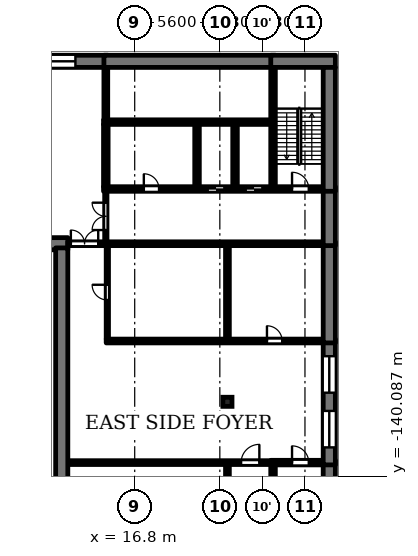
"""IFC4 building model, lengths in metres.
Left out: names, types, materials, properties, quantities, classifications, styles, units other than length and angle.
Written with IfcOpenShell. Run it as: python <this file> out.ifc"""

import sys

from ifc_helpers import new_model, si_unit, direction, frame, frame_2d, origin, origin_2d, place, context, subcontext, project, spatial, rectangle, extrude, element, fill, save


model = new_model("IFC4")
c1 = context("Model", 3, precision=1e-05, world=origin(), true_north=direction((0.0, 1.0)))
c2 = subcontext(c1, "Body", "Model", "MODEL_VIEW")
j1 = project(units=[si_unit("LENGTHUNIT", "METRE"), si_unit("PLANEANGLEUNIT", "RADIAN")], contexts=[c1])
p1 = place(None, origin())
s1 = spatial("IfcSite", under=j1, at=p1, CompositionType="ELEMENT")
p2 = place(p1, origin())
s2 = spatial("IfcBuilding", under=s1, at=p2, CompositionType="ELEMENT")
p3 = place(p2, frame((0.0, 0.0, 16.1)))
s3 = spatial("IfcBuildingStorey", under=s2, at=p3, CompositionType="ELEMENT", Elevation=16.1)
p4 = place(p3, frame((22.9, -135.2, 0.0), z_axis=(0.0, 0.0, 1.0), x_axis=(1.0, 0.0, 0.0)))
e1 = element("IfcColumn", 1, at=p4, inside=s3, PredefinedType="COLUMN", context=c2, shape_type="SweptSolid", body=[
    extrude(rectangle(XDim=0.6, YDim=0.6, at=origin_2d()), origin(), (0.0, 0.0, 1.0), 4.45),
])
p5 = place(p3, frame((12.4, -139.2, 0.0), z_axis=(0.0, 0.0, 1.0), x_axis=(1.0, 0.0, 0.0)))
e2 = element("IfcWall", 2, at=p5, inside=s3, PredefinedType="SOLIDWALL", context=c2, shape_type="SweptSolid", body=[
    extrude(rectangle(XDim=13.35, YDim=0.25, at=frame_2d((6.675, 0.0))), origin(), (0.0, 0.0, 1.0), 4.45),
])
p6 = place(p5, frame((11.4, 0.0, 0.0)))
e3 = element("IfcOpeningElement", 3, at=p6, cuts=e2, PredefinedType="OPENING", context=c2, shape_type="SweptSolid", body=[
    extrude(rectangle(XDim=1.2, YDim=2.1, at=frame_2d((0.6, 1.05))), frame((0.0, 0.135, 0.0), z_axis=(0.0, -1.0, 0.0), x_axis=(1.0, 0.0, 0.0)), (0.0, 0.0, 1.0), 0.27),
])
p7 = place(p3, frame((25.75, -139.2, 0.0), z_axis=(0.0, 0.0, 1.0), x_axis=(1.0, 0.0, 0.0)))
e4 = element("IfcWall", 4, at=p7, inside=s3, PredefinedType="SOLIDWALL", context=c2, shape_type="SweptSolid", body=[
    extrude(rectangle(XDim=3.45, YDim=0.3, at=frame_2d((1.725, 0.0))), origin(), (0.0, 0.0, 1.0), 4.45),
])
p8 = place(p7, frame((1.4, 0.0, 0.0)))
e5 = element("IfcOpeningElement", 5, at=p8, cuts=e4, PredefinedType="OPENING", context=c2, shape_type="SweptSolid", body=[
    extrude(rectangle(XDim=1.1, YDim=2.1, at=frame_2d((0.55, 1.05))), frame((0.0, 0.16, 0.0), z_axis=(0.0, -1.0, 0.0), x_axis=(1.0, 0.0, 0.0)), (0.0, 0.0, 1.0), 0.32),
])
p9 = place(p3, frame((14.925, -131.2, 0.0), z_axis=(0.0, 0.0, 1.0), x_axis=(1.0, 0.0, 0.0)))
e6 = element("IfcWall", 6, at=p9, inside=s3, PredefinedType="SOLIDWALL", context=c2, shape_type="SweptSolid", body=[
    extrude(rectangle(XDim=14.275, YDim=0.25, at=frame_2d((7.137, 0.0))), origin(), (0.0, 0.0, 1.0), 4.45),
])
p10 = place(p9, frame((10.575, 0.0, 0.0)))
e7 = element("IfcOpeningElement", 7, at=p10, cuts=e6, PredefinedType="OPENING", context=c2, shape_type="SweptSolid", body=[
    extrude(rectangle(XDim=1.0, YDim=2.1, at=frame_2d((0.5, 1.05))), frame((0.0, 0.135, 0.0), z_axis=(0.0, -1.0, 0.0), x_axis=(1.0, 0.0, 0.0)), (0.0, 0.0, 1.0), 0.27),
])
p11 = place(p3, frame((-12.4, -124.8, 0.0), z_axis=(0.0, 0.0, 1.0), x_axis=(1.0, 0.0, 0.0)))
e8 = element("IfcWall", 8, at=p11, inside=s3, PredefinedType="SOLIDWALL", context=c2, shape_type="SweptSolid", body=[
    extrude(rectangle(XDim=24.8, YDim=0.8, at=frame_2d((12.4, 0.0))), origin(), (0.0, 0.0, 1.0), 4.8),
])
p12 = place(p3, frame((12.4, -124.8, 0.0), z_axis=(0.0, 0.0, 1.0), x_axis=(1.0, 0.0, 0.0)))
e9 = element("IfcWall", 9, at=p12, inside=s3, PredefinedType="SOLIDWALL", context=c2, shape_type="SweptSolid", body=[
    extrude(rectangle(XDim=16.8, YDim=0.25, at=frame_2d((8.4, 0.0))), origin(), (0.0, 0.0, 1.0), 4.45),
])
p13 = place(p12, frame((0.2, 0.0, 0.0)))
e10 = element("IfcOpeningElement", 10, at=p13, cuts=e9, PredefinedType="OPENING", context=c2, shape_type="SweptSolid", body=[
    extrude(rectangle(XDim=1.8, YDim=2.1, at=frame_2d((0.9, 1.05))), frame((0.0, 0.135, 0.0), z_axis=(0.0, -1.0, 0.0), x_axis=(1.0, 0.0, 0.0)), (0.0, 0.0, 1.0), 0.27),
])
p14 = place(p3, frame((14.75, -121.2, 0.0), z_axis=(0.0, 0.0, 1.0), x_axis=(1.0, 0.0, 0.0)))
e11 = element("IfcWall", 11, at=p14, inside=s3, PredefinedType="SOLIDWALL", context=c2, shape_type="SweptSolid", body=[
    extrude(rectangle(XDim=14.45, YDim=0.3, at=frame_2d((7.225, 0.0))), origin(), (0.0, 0.0, 1.0), 4.45),
])
p15 = place(p14, frame((6.85, 0.0, 0.0)))
e12 = element("IfcOpeningElement", 12, at=p15, cuts=e11, PredefinedType="OPENING", context=c2, shape_type="SweptSolid", body=[
    extrude(rectangle(XDim=1.1, YDim=2.1, at=frame_2d((0.55, 1.05))), frame((0.0, 0.16, 0.0), z_axis=(0.0, -1.0, 0.0), x_axis=(1.0, 0.0, 0.0)), (0.0, 0.0, 1.0), 0.32),
])
p16 = place(p14, frame((9.35, 0.0, 0.0)))
e13 = element("IfcOpeningElement", 13, at=p16, cuts=e11, PredefinedType="OPENING", context=c2, shape_type="SweptSolid", body=[
    extrude(rectangle(XDim=1.1, YDim=2.1, at=frame_2d((0.55, 1.05))), frame((0.0, 0.16, 0.0), z_axis=(0.0, -1.0, 0.0), x_axis=(1.0, 0.0, 0.0)), (0.0, 0.0, 1.0), 0.32),
])
p17 = place(p14, frame((12.4, 0.0, 0.0)))
e14 = element("IfcOpeningElement", 14, at=p17, cuts=e11, PredefinedType="OPENING", context=c2, shape_type="SweptSolid", body=[
    extrude(rectangle(XDim=1.1, YDim=2.1, at=frame_2d((0.55, 1.05))), frame((0.0, 0.16, 0.0), z_axis=(0.0, -1.0, 0.0), x_axis=(1.0, 0.0, 0.0)), (0.0, 0.0, 1.0), 0.32),
])
p18 = place(p14, frame((2.65, 0.0, 0.0)))
e15 = element("IfcOpeningElement", 15, at=p18, cuts=e11, PredefinedType="OPENING", context=c2, shape_type="SweptSolid", body=[
    extrude(rectangle(XDim=1.0, YDim=2.1, at=frame_2d((0.5, 1.05))), frame((0.0, 0.16, 0.0), z_axis=(0.0, -1.0, 0.0), x_axis=(1.0, 0.0, 0.0)), (0.0, 0.0, 1.0), 0.32),
])
p19 = place(p3, frame((14.75, -116.8, 0.0), z_axis=(0.0, 0.0, 1.0), x_axis=(1.0, 0.0, 0.0)))
e16 = element("IfcWall", 16, at=p19, inside=s3, PredefinedType="SOLIDWALL", context=c2, shape_type="SweptSolid", body=[
    extrude(rectangle(XDim=11.0, YDim=0.3, at=frame_2d((5.5, 0.0))), origin(), (0.0, 0.0, 1.0), 4.45),
])
p20 = place(p3, frame((-15.025, -112.8, 0.0), z_axis=(0.0, 0.0, 1.0), x_axis=(1.0, 0.0, 0.0)))
e17 = element("IfcWall", 17, at=p20, inside=s3, PredefinedType="SOLIDWALL", context=c2, shape_type="SweptSolid", body=[
    extrude(rectangle(XDim=30.05, YDim=0.8, at=frame_2d((15.025, 0.0))), origin(), (0.0, 0.0, 1.0), 4.45),
])
p21 = place(p20, frame((2.125, 0.0, 0.9)))
e18 = element("IfcOpeningElement", 18, at=p21, cuts=e17, PredefinedType="OPENING", context=c2, shape_type="SweptSolid", body=[
    extrude(rectangle(XDim=1.8, YDim=1.5, at=frame_2d((0.9, 0.75))), frame((0.0, 0.41, 0.0), z_axis=(0.0, -1.0, 0.0), x_axis=(1.0, 0.0, 0.0)), (0.0, 0.0, 1.0), 0.82),
])
p22 = place(p20, frame((5.125, 0.0, 0.9)))
e19 = element("IfcOpeningElement", 19, at=p22, cuts=e17, PredefinedType="OPENING", context=c2, shape_type="SweptSolid", body=[
    extrude(rectangle(XDim=1.8, YDim=1.5, at=frame_2d((0.9, 0.75))), frame((0.0, 0.41, 0.0), z_axis=(0.0, -1.0, 0.0), x_axis=(1.0, 0.0, 0.0)), (0.0, 0.0, 1.0), 0.82),
])
p23 = place(p20, frame((8.125, 0.0, 0.9)))
e20 = element("IfcOpeningElement", 20, at=p23, cuts=e17, PredefinedType="OPENING", context=c2, shape_type="SweptSolid", body=[
    extrude(rectangle(XDim=1.8, YDim=1.5, at=frame_2d((0.9, 0.75))), frame((0.0, 0.41, 0.0), z_axis=(0.0, -1.0, 0.0), x_axis=(1.0, 0.0, 0.0)), (0.0, 0.0, 1.0), 0.82),
])
p24 = place(p20, frame((11.125, 0.0, 0.9)))
e21 = element("IfcOpeningElement", 21, at=p24, cuts=e17, PredefinedType="OPENING", context=c2, shape_type="SweptSolid", body=[
    extrude(rectangle(XDim=1.8, YDim=1.5, at=frame_2d((0.9, 0.75))), frame((0.0, 0.41, 0.0), z_axis=(0.0, -1.0, 0.0), x_axis=(1.0, 0.0, 0.0)), (0.0, 0.0, 1.0), 0.82),
])
p25 = place(p20, frame((14.125, 0.0, 0.9)))
e22 = element("IfcOpeningElement", 22, at=p25, cuts=e17, PredefinedType="OPENING", context=c2, shape_type="SweptSolid", body=[
    extrude(rectangle(XDim=1.8, YDim=1.5, at=frame_2d((0.9, 0.75))), frame((0.0, 0.41, 0.0), z_axis=(0.0, -1.0, 0.0), x_axis=(1.0, 0.0, 0.0)), (0.0, 0.0, 1.0), 0.82),
])
p26 = place(p20, frame((17.125, 0.0, 0.9)))
e23 = element("IfcOpeningElement", 23, at=p26, cuts=e17, PredefinedType="OPENING", context=c2, shape_type="SweptSolid", body=[
    extrude(rectangle(XDim=1.8, YDim=1.5, at=frame_2d((0.9, 0.75))), frame((0.0, 0.41, 0.0), z_axis=(0.0, -1.0, 0.0), x_axis=(1.0, 0.0, 0.0)), (0.0, 0.0, 1.0), 0.82),
])
p27 = place(p20, frame((20.125, 0.0, 0.9)))
e24 = element("IfcOpeningElement", 24, at=p27, cuts=e17, PredefinedType="OPENING", context=c2, shape_type="SweptSolid", body=[
    extrude(rectangle(XDim=1.8, YDim=1.5, at=frame_2d((0.9, 0.75))), frame((0.0, 0.41, 0.0), z_axis=(0.0, -1.0, 0.0), x_axis=(1.0, 0.0, 0.0)), (0.0, 0.0, 1.0), 0.82),
])
p28 = place(p20, frame((23.125, 0.0, 0.9)))
e25 = element("IfcOpeningElement", 25, at=p28, cuts=e17, PredefinedType="OPENING", context=c2, shape_type="SweptSolid", body=[
    extrude(rectangle(XDim=1.8, YDim=1.5, at=frame_2d((0.9, 0.75))), frame((0.0, 0.41, 0.0), z_axis=(0.0, -1.0, 0.0), x_axis=(1.0, 0.0, 0.0)), (0.0, 0.0, 1.0), 0.82),
])
p29 = place(p20, frame((26.125, 0.0, 0.9)))
e26 = element("IfcOpeningElement", 26, at=p29, cuts=e17, PredefinedType="OPENING", context=c2, shape_type="SweptSolid", body=[
    extrude(rectangle(XDim=1.8, YDim=1.5, at=frame_2d((0.9, 0.75))), frame((0.0, 0.41, 0.0), z_axis=(0.0, -1.0, 0.0), x_axis=(1.0, 0.0, 0.0)), (0.0, 0.0, 1.0), 0.82),
])
p30 = place(p3, frame((14.775, -112.8, 0.0), z_axis=(0.0, 0.0, 1.0), x_axis=(1.0, 0.0, 0.0)))
e27 = element("IfcWall", 27, at=p30, inside=s3, PredefinedType="SOLIDWALL", context=c2, shape_type="SweptSolid", body=[
    extrude(rectangle(XDim=11.275, YDim=0.8, at=frame_2d((5.637, 0.0))), origin(), (0.0, 0.0, 1.0), 4.45),
])
p31 = place(p3, frame((25.75, -112.8, 0.0), z_axis=(0.0, 0.0, 1.0), x_axis=(1.0, 0.0, 0.0)))
e28 = element("IfcWall", 28, at=p31, inside=s3, PredefinedType="SOLIDWALL", context=c2, shape_type="SweptSolid", body=[
    extrude(rectangle(XDim=4.25, YDim=0.8, at=frame_2d((2.125, 0.0))), origin(), (0.0, 0.0, 1.0), 4.45),
])
p32 = place(p3, frame((12.0, -159.2, 0.0), z_axis=(0.0, 0.0, 1.0), x_axis=(0.0, 1.0, 0.0)))
e29 = element("IfcWall", 29, at=p32, inside=s3, PredefinedType="SOLIDWALL", context=c2, shape_type="SweptSolid", body=[
    extrude(rectangle(XDim=34.125, YDim=0.8, at=frame_2d((17.062, 0.0))), origin(), (0.0, 0.0, 1.0), 4.8),
])
p33 = place(p3, frame((14.9, -124.675, 0.0), z_axis=(0.0, 0.0, 1.0), x_axis=(0.0, 1.0, 0.0)))
e30 = element("IfcWall", 30, at=p33, inside=s3, PredefinedType="PARTITIONING", context=c2, shape_type="SweptSolid", body=[
    extrude(rectangle(XDim=3.325, YDim=0.15, at=frame_2d((1.663, 0.0))), origin(), (0.0, 0.0, 1.0), 4.45),
])
p34 = place(p33, frame((0.775, 0.0, 0.0)))
e31 = element("IfcOpeningElement", 31, at=p34, cuts=e30, PredefinedType="OPENING", context=c2, shape_type="SweptSolid", body=[
    extrude(rectangle(XDim=1.8, YDim=2.1, at=frame_2d((0.9, 1.05))), frame((0.0, 0.085, 0.0), z_axis=(0.0, -1.0, 0.0), x_axis=(1.0, 0.0, 0.0)), (0.0, 0.0, 1.0), 0.17),
])
p35 = place(p3, frame((14.9, -121.05, 0.0), z_axis=(0.0, 0.0, 1.0), x_axis=(0.0, 1.0, 0.0)))
e32 = element("IfcWall", 32, at=p35, inside=s3, PredefinedType="SOLIDWALL", context=c2, shape_type="SweptSolid", body=[
    extrude(rectangle(XDim=4.1, YDim=0.3, at=frame_2d((2.05, 0.0))), origin(), (0.0, 0.0, 1.0), 4.45),
])
p36 = place(p3, frame((14.9, -116.65, 0.0), z_axis=(0.0, 0.0, 1.0), x_axis=(0.0, 1.0, 0.0)))
e33 = element("IfcWall", 33, at=p36, inside=s3, PredefinedType="SOLIDWALL", context=c2, shape_type="SweptSolid", body=[
    extrude(rectangle(XDim=3.45, YDim=0.25, at=frame_2d((1.725, 0.0))), origin(), (0.0, 0.0, 1.0), 4.45),
])
p37 = place(p3, frame((15.0, -131.075, 0.0), z_axis=(0.0, 0.0, 1.0), x_axis=(0.0, 1.0, 0.0)))
e34 = element("IfcWall", 34, at=p37, inside=s3, PredefinedType="PARTITIONING", context=c2, shape_type="SweptSolid", body=[
    extrude(rectangle(XDim=6.15, YDim=0.15, at=frame_2d((3.075, 0.0))), origin(), (0.0, 0.0, 1.0), 4.45),
])
p38 = place(p37, frame((2.575, 0.0, 0.0)))
e35 = element("IfcOpeningElement", 35, at=p38, cuts=e34, PredefinedType="OPENING", context=c2, shape_type="SweptSolid", body=[
    extrude(rectangle(XDim=1.0, YDim=2.1, at=frame_2d((0.5, 1.05))), frame((0.0, 0.085, 0.0), z_axis=(0.0, -1.0, 0.0), x_axis=(1.0, 0.0, 0.0)), (0.0, 0.0, 1.0), 0.17),
])
p39 = place(p3, frame((20.9, -121.05, 0.0), z_axis=(0.0, 0.0, 1.0), x_axis=(0.0, 1.0, 0.0)))
e36 = element("IfcWall", 36, at=p39, inside=s3, PredefinedType="SOLIDWALL", context=c2, shape_type="SweptSolid", body=[
    extrude(rectangle(XDim=4.1, YDim=0.3, at=frame_2d((2.05, 0.0))), origin(), (0.0, 0.0, 1.0), 4.45),
])
p40 = place(p3, frame((22.9, -159.2, 0.0), z_axis=(0.0, 0.0, 1.0), x_axis=(0.0, 1.0, 0.0)))
e37 = element("IfcWall", 37, at=p40, inside=s3, PredefinedType="SOLIDWALL", context=c2, shape_type="SweptSolid", body=[
    extrude(rectangle(XDim=19.875, YDim=0.25, at=frame_2d((9.938, 0.0))), origin(), (0.0, 0.0, 1.0), 4.45),
])
p41 = place(p40, frame((14.0, 0.0, 0.0)))
e38 = element("IfcOpeningElement", 38, at=p41, cuts=e37, PredefinedType="OPENING", context=c2, shape_type="SweptSolid", body=[
    extrude(rectangle(XDim=1.8, YDim=2.1, at=frame_2d((0.9, 1.05))), frame((0.0, 0.135, 0.0), z_axis=(0.0, -1.0, 0.0), x_axis=(1.0, 0.0, 0.0)), (0.0, 0.0, 1.0), 0.27),
])
p42 = place(p40, frame((4.2, 0.0, 0.0)))
e39 = element("IfcOpeningElement", 39, at=p42, cuts=e37, PredefinedType="OPENING", context=c2, shape_type="SweptSolid", body=[
    extrude(rectangle(XDim=1.0, YDim=2.1, at=frame_2d((0.5, 1.05))), frame((0.0, 0.135, 0.0), z_axis=(0.0, -1.0, 0.0), x_axis=(1.0, 0.0, 0.0)), (0.0, 0.0, 1.0), 0.27),
])
p43 = place(p3, frame((22.9, -131.075, 0.0), z_axis=(0.0, 0.0, 1.0), x_axis=(0.0, 1.0, 0.0)))
e40 = element("IfcWall", 40, at=p43, inside=s3, PredefinedType="SOLIDWALL", context=c2, shape_type="SweptSolid", body=[
    extrude(rectangle(XDim=6.15, YDim=0.25, at=frame_2d((3.075, 0.0))), origin(), (0.0, 0.0, 1.0), 4.45),
])
p44 = place(p3, frame((23.4, -121.05, 0.0), z_axis=(0.0, 0.0, 1.0), x_axis=(0.0, 1.0, 0.0)))
e41 = element("IfcWall", 41, at=p44, inside=s3, PredefinedType="SOLIDWALL", context=c2, shape_type="SweptSolid", body=[
    extrude(rectangle(XDim=4.1, YDim=0.3, at=frame_2d((2.05, 0.0))), origin(), (0.0, 0.0, 1.0), 4.45),
])
p45 = place(p3, frame((25.9, -152.05, 0.0), z_axis=(0.0, 0.0, 1.0), x_axis=(0.0, 1.0, 0.0)))
e42 = element("IfcWall", 42, at=p45, inside=s3, PredefinedType="SOLIDWALL", context=c2, shape_type="SweptSolid", body=[
    extrude(rectangle(XDim=12.825, YDim=0.3, at=frame_2d((6.413, 0.0))), origin(), (0.0, 0.0, 1.0), 4.45),
])
p46 = place(p45, frame((1.45, 0.0, 0.0)))
e43 = element("IfcOpeningElement", 43, at=p46, cuts=e42, PredefinedType="OPENING", context=c2, shape_type="SweptSolid", body=[
    extrude(rectangle(XDim=1.4, YDim=2.2, at=frame_2d((0.7, 1.1))), frame((0.0, 0.16, 0.0), z_axis=(0.0, -1.0, 0.0), x_axis=(1.0, 0.0, 0.0)), (0.0, 0.0, 1.0), 0.32),
])
p47 = place(p3, frame((25.9, -121.05, 0.0), z_axis=(0.0, 0.0, 1.0), x_axis=(0.0, 1.0, 0.0)))
e44 = element("IfcWall", 44, at=p47, inside=s3, PredefinedType="SOLIDWALL", context=c2, shape_type="SweptSolid", body=[
    extrude(rectangle(XDim=7.85, YDim=0.3, at=frame_2d((3.925, 0.0))), origin(), (0.0, 0.0, 1.0), 4.45),
])
p48 = place(p3, frame((29.6, -139.05, 0.0), z_axis=(0.0, 0.0, 1.0), x_axis=(0.0, -1.0, 0.0)))
e45 = element("IfcWall", 45, at=p48, inside=s3, PredefinedType="SOLIDWALL", context=c2, shape_type="SweptSolid", body=[
    extrude(rectangle(XDim=8.7, YDim=0.8, at=frame_2d((4.35, 0.0))), origin(), (0.0, 0.0, 1.0), 4.45),
])
p49 = place(p3, frame((29.6, -131.075, 0.0), z_axis=(0.0, 0.0, 1.0), x_axis=(0.0, -1.0, 0.0)))
e46 = element("IfcWall", 46, at=p49, inside=s3, PredefinedType="SOLIDWALL", context=c2, shape_type="SweptSolid", body=[
    extrude(rectangle(XDim=8.275, YDim=0.8, at=frame_2d((4.137, 0.0))), origin(), (0.0, 0.0, 1.0), 4.45),
])
p50 = place(p49, frame((4.725, 0.0, 0.6)))
e47 = element("IfcOpeningElement", 47, at=p50, cuts=e46, PredefinedType="OPENING", context=c2, shape_type="SweptSolid", body=[
    extrude(rectangle(XDim=2.4, YDim=3.2, at=frame_2d((1.2, 1.6))), frame((0.0, 0.41, 0.0), z_axis=(0.0, -1.0, 0.0), x_axis=(1.0, 0.0, 0.0)), (0.0, 0.0, 1.0), 0.82),
])
p51 = place(p49, frame((1.125, 0.0, 0.6)))
e48 = element("IfcOpeningElement", 48, at=p51, cuts=e46, PredefinedType="OPENING", context=c2, shape_type="SweptSolid", body=[
    extrude(rectangle(XDim=2.4, YDim=3.2, at=frame_2d((1.2, 1.6))), frame((0.0, 0.41, 0.0), z_axis=(0.0, -1.0, 0.0), x_axis=(1.0, 0.0, 0.0)), (0.0, 0.0, 1.0), 0.82),
])
p52 = place(p3, frame((29.6, -124.675, 0.0), z_axis=(0.0, 0.0, 1.0), x_axis=(0.0, -1.0, 0.0)))
e49 = element("IfcWall", 49, at=p52, inside=s3, PredefinedType="SOLIDWALL", context=c2, shape_type="SweptSolid", body=[
    extrude(rectangle(XDim=6.65, YDim=0.8, at=frame_2d((3.325, 0.0))), origin(), (0.0, 0.0, 1.0), 4.45),
])
p53 = place(p3, frame((29.6, -121.05, 0.0), z_axis=(0.0, 0.0, 1.0), x_axis=(0.0, -1.0, 0.0)))
e50 = element("IfcWall", 50, at=p53, inside=s3, PredefinedType="SOLIDWALL", context=c2, shape_type="SweptSolid", body=[
    extrude(rectangle(XDim=3.875, YDim=0.8, at=frame_2d((1.938, 0.0))), origin(), (0.0, 0.0, 1.0), 4.45),
])
p54 = place(p3, frame((29.6, -113.2, 0.0), z_axis=(0.0, 0.0, 1.0), x_axis=(0.0, -1.0, 0.0)))
e51 = element("IfcWall", 51, at=p54, inside=s3, PredefinedType="SOLIDWALL", context=c2, shape_type="SweptSolid", body=[
    extrude(rectangle(XDim=8.15, YDim=0.8, at=frame_2d((4.075, 0.0))), origin(), (0.0, 0.0, 1.0), 4.45),
])
p55 = place(p29, origin())
e52 = element("IfcWindow", 52, at=p55, inside=s3, PartitioningType="SINGLE_PANEL", PredefinedType="WINDOW", context=c2, shape_type="SweptSolid", body=[
    extrude(rectangle(XDim=1.8, YDim=1.5, at=frame_2d((0.9, 0.75))), frame((0.0, 0.03, 0.0), z_axis=(0.0, -1.0, 0.0), x_axis=(1.0, 0.0, 0.0)), (0.0, 0.0, 1.0), 0.06),
])
fill(e26, e52)
p56 = place(p50, origin())
e53 = element("IfcWindow", 53, at=p56, inside=s3, PartitioningType="SINGLE_PANEL", PredefinedType="WINDOW", context=c2, shape_type="SweptSolid", body=[
    extrude(rectangle(XDim=2.4, YDim=3.2, at=frame_2d((1.2, 1.6))), frame((0.0, 0.03, 0.0), z_axis=(0.0, -1.0, 0.0), x_axis=(1.0, 0.0, 0.0)), (0.0, 0.0, 1.0), 0.06),
])
fill(e47, e53)
p57 = place(p51, origin())
e54 = element("IfcWindow", 54, at=p57, inside=s3, PartitioningType="SINGLE_PANEL", PredefinedType="WINDOW", context=c2, shape_type="SweptSolid", body=[
    extrude(rectangle(XDim=2.4, YDim=3.2, at=frame_2d((1.2, 1.6))), frame((0.0, 0.03, 0.0), z_axis=(0.0, -1.0, 0.0), x_axis=(1.0, 0.0, 0.0)), (0.0, 0.0, 1.0), 0.06),
])
fill(e48, e54)
p58 = place(p15, origin())
e55 = element("IfcDoor", 55, at=p58, inside=s3, OperationType="DOUBLE_DOOR_SLIDING", PredefinedType="DOOR", context=c2, shape_type="SweptSolid", body=[
    extrude(rectangle(XDim=1.1, YDim=2.1, at=frame_2d((0.55, 1.05))), frame((0.0, 0.025, 0.0), z_axis=(0.0, -1.0, 0.0), x_axis=(1.0, 0.0, 0.0)), (0.0, 0.0, 1.0), 0.05),
])
fill(e12, e55)
p59 = place(p16, origin())
e56 = element("IfcDoor", 56, at=p59, inside=s3, OperationType="DOUBLE_DOOR_SLIDING", PredefinedType="DOOR", context=c2, shape_type="SweptSolid", body=[
    extrude(rectangle(XDim=1.1, YDim=2.1, at=frame_2d((0.55, 1.05))), frame((0.0, 0.025, 0.0), z_axis=(0.0, -1.0, 0.0), x_axis=(1.0, 0.0, 0.0)), (0.0, 0.0, 1.0), 0.05),
])
fill(e13, e56)
p60 = place(p17, origin())
e57 = element("IfcDoor", 57, at=p60, inside=s3, OperationType="SINGLE_SWING_LEFT", PredefinedType="DOOR", context=c2, shape_type="SweptSolid", body=[
    extrude(rectangle(XDim=1.1, YDim=2.1, at=frame_2d((0.55, 1.05))), frame((0.0, 0.025, 0.0), z_axis=(0.0, -1.0, 0.0), x_axis=(1.0, 0.0, 0.0)), (0.0, 0.0, 1.0), 0.05),
])
fill(e14, e57)
p61 = place(p8, origin())
e58 = element("IfcDoor", 58, at=p61, inside=s3, OperationType="SINGLE_SWING_LEFT", PredefinedType="DOOR", context=c2, shape_type="SweptSolid", body=[
    extrude(rectangle(XDim=1.1, YDim=2.1, at=frame_2d((0.55, 1.05))), frame((0.0, 0.025, 0.0), z_axis=(0.0, -1.0, 0.0), x_axis=(1.0, 0.0, 0.0)), (0.0, 0.0, 1.0), 0.05),
])
fill(e5, e58)
p62 = place(p18, origin())
e59 = element("IfcDoor", 59, at=p62, inside=s3, OperationType="SINGLE_SWING_LEFT", PredefinedType="DOOR", context=c2, shape_type="SweptSolid", body=[
    extrude(rectangle(XDim=1.0, YDim=2.1, at=frame_2d((0.5, 1.05))), frame((0.0, 0.025, 0.0), z_axis=(0.0, -1.0, 0.0), x_axis=(1.0, 0.0, 0.0)), (0.0, 0.0, 1.0), 0.05),
])
fill(e15, e59)
p63 = place(p34, origin())
e60 = element("IfcDoor", 60, at=p63, inside=s3, OperationType="DOUBLE_DOOR_SINGLE_SWING", PredefinedType="DOOR", context=c2, shape_type="SweptSolid", body=[
    extrude(rectangle(XDim=1.8, YDim=2.1, at=frame_2d((0.9, 1.05))), frame((0.0, 0.025, 0.0), z_axis=(0.0, -1.0, 0.0), x_axis=(1.0, 0.0, 0.0)), (0.0, 0.0, 1.0), 0.05),
])
fill(e31, e60)
p64 = place(p13, origin())
e61 = element("IfcDoor", 61, at=p64, inside=s3, OperationType="DOUBLE_DOOR_SINGLE_SWING", PredefinedType="DOOR", context=c2, shape_type="SweptSolid", body=[
    extrude(rectangle(XDim=1.8, YDim=2.1, at=frame_2d((0.9, 1.05))), frame((0.0, 0.025, 0.0), z_axis=(0.0, -1.0, 0.0), x_axis=(1.0, 0.0, 0.0)), (0.0, 0.0, 1.0), 0.05),
])
fill(e10, e61)
p65 = place(p6, origin())
e62 = element("IfcDoor", 62, at=p65, inside=s3, OperationType="SINGLE_SWING_RIGHT", PredefinedType="DOOR", context=c2, shape_type="SweptSolid", body=[
    extrude(rectangle(XDim=1.2, YDim=2.1, at=frame_2d((0.6, 1.05))), frame((0.0, 0.025, 0.0), z_axis=(0.0, -1.0, 0.0), x_axis=(1.0, 0.0, 0.0)), (0.0, 0.0, 1.0), 0.05),
])
fill(e3, e62)
p66 = place(p38, origin())
e63 = element("IfcDoor", 63, at=p66, inside=s3, OperationType="SINGLE_SWING_RIGHT", PredefinedType="DOOR", context=c2, shape_type="SweptSolid", body=[
    extrude(rectangle(XDim=1.0, YDim=2.1, at=frame_2d((0.5, 1.05))), frame((0.0, 0.025, 0.0), z_axis=(0.0, -1.0, 0.0), x_axis=(1.0, 0.0, 0.0)), (0.0, 0.0, 1.0), 0.05),
])
fill(e35, e63)
p67 = place(p10, origin())
e64 = element("IfcDoor", 64, at=p67, inside=s3, OperationType="SINGLE_SWING_LEFT", PredefinedType="DOOR", context=c2, shape_type="SweptSolid", body=[
    extrude(rectangle(XDim=1.0, YDim=2.1, at=frame_2d((0.5, 1.05))), frame((0.0, 0.025, 0.0), z_axis=(0.0, -1.0, 0.0), x_axis=(1.0, 0.0, 0.0)), (0.0, 0.0, 1.0), 0.05),
])
fill(e7, e64)
save(model, sys.argv[1])
